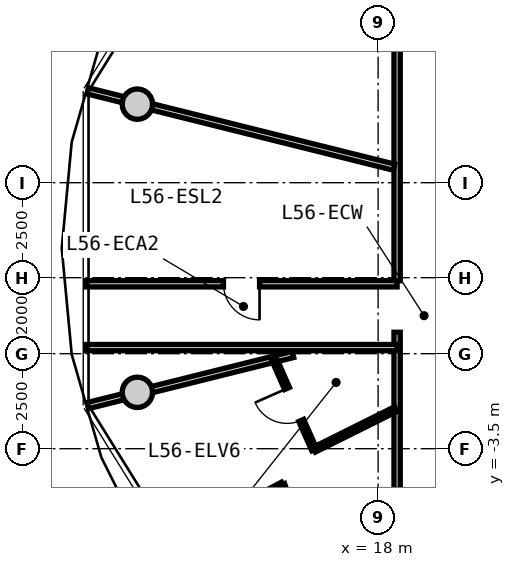
"""IFC4 building model, lengths in metres.
Left out: names, types, materials, properties, quantities, classifications, styles, units other than length and angle.
Written with IfcOpenShell. Run it as: python <this file> out.ifc"""

import sys

from ifc_helpers import new_model, si_unit, direction, frame, frame_2d, origin, origin_2d, place, context, subcontext, project, spatial, rectangle, circle, extrude, source, transform, mapped, element, fill, save


model = new_model("IFC4")
c1 = context("Model", 3, precision=1e-05, world=origin(), true_north=direction((0.0, 1.0)))
c2 = subcontext(c1, "Body", "Model", "MODEL_VIEW")
j1 = project(units=[si_unit("LENGTHUNIT", "METRE"), si_unit("PLANEANGLEUNIT", "RADIAN")], contexts=[c1])
p1 = place(None, origin())
s1 = spatial("IfcSite", under=j1, at=p1, CompositionType="ELEMENT")
p2 = place(p1, origin())
s2 = spatial("IfcBuilding", under=s1, at=p2, CompositionType="ELEMENT")
p3 = place(p2, frame((0.0, 0.0, 180.05)))
s3 = spatial("IfcBuildingStorey", under=s2, at=p3, CompositionType="ELEMENT", Elevation=180.05)
m1 = source(origin(), c2, "Body", "SweptSolid", [
    extrude(circle(Radius=0.4, at=origin_2d()), origin(), (0.0, 0.0, 1.0), 3.05),
])
for number, where, z_axis, x_axis in (
    (1, (11.665, 5.567, 0.0), (0.0, 0.0, 1.0), (1.0, 0.0, 0.0)),
    (2, (11.665, -2.016, 0.0), (0.0, 0.0, 1.0), (1.0, 0.0, 0.0)),
):
    element("IfcColumn", number, at=place(p3, frame(where, z_axis=z_axis, x_axis=x_axis)), inside=s3, PredefinedType="COLUMN", context=c2, shape_type="MappedRepresentation", body=[
        mapped(m1, transform((0.0, 0.0, 0.0), x_axis=(1.0, 0.0, 0.0), y_axis=(0.0, 1.0, 0.0), z_axis=(0.0, 0.0, 1.0), scale=1.0)),
    ])
m2 = source(origin(), c2, "Body", "SweptSolid", [
    extrude(rectangle(XDim=7.365, YDim=0.165, at=frame_2d((3.682, 0.0))), origin(), (0.0, 0.0, 1.0), 2.795),
])
p4 = place(p3, frame((18.5, -7.8, 0.0), z_axis=(0.0, 0.0, 1.0), x_axis=(0.0, 1.0, 0.0)))
e3 = element("IfcWall", 3, at=p4, inside=s3, PredefinedType="PARTITIONING", context=c2, shape_type="MappedRepresentation", body=[
    mapped(m2, transform((0.0, 0.0, 0.0), x_axis=(1.0, 0.0, 0.0), y_axis=(0.0, 1.0, 0.0), z_axis=(0.0, 0.0, 1.0), scale=1.0)),
])
m3 = source(origin(), c2, "Body", "SweptSolid", [
    extrude(rectangle(XDim=6.88, YDim=0.165, at=frame_2d((3.44, 0.0))), origin(), (0.0, 0.0, 1.0), 2.795),
])
p5 = place(p3, frame((18.5, 0.92, 0.0), z_axis=(0.0, 0.0, 1.0), x_axis=(0.0, 1.0, 0.0)))
e4 = element("IfcWall", 4, at=p5, inside=s3, PredefinedType="PARTITIONING", context=c2, shape_type="MappedRepresentation", body=[
    mapped(m3, transform((0.0, 0.0, 0.0), x_axis=(1.0, 0.0, 0.0), y_axis=(0.0, 1.0, 0.0), z_axis=(0.0, 0.0, 1.0), scale=1.0)),
])
m4 = source(origin(), c2, "Body", "SweptSolid", [
    extrude(rectangle(XDim=8.305, YDim=0.165, at=frame_2d((4.153, 0.0))), origin(), (0.0, 0.0, 1.0), 2.345),
])
p6 = place(p3, frame((18.42, 3.908, 0.0), z_axis=(0.0, 0.0, 1.0), x_axis=(-0.970309994378, 0.241864662175, 0.0)))
e5 = element("IfcWall", 5, at=p6, inside=s3, PredefinedType="PARTITIONING", context=c2, shape_type="MappedRepresentation", body=[
    mapped(m4, transform((0.0, 0.0, 0.0), x_axis=(1.0, 0.0, 0.0), y_axis=(0.0, 1.0, 0.0), z_axis=(0.0, 0.0, 1.0), scale=1.0)),
])
m5 = source(origin(), c2, "Body", "SweptSolid", [
    extrude(rectangle(XDim=5.564, YDim=0.165, at=frame_2d((2.782, 0.0))), origin(), (0.0, 0.0, 1.0), 2.345),
])
p7 = place(p3, frame((15.76, -1.02, 0.0), z_axis=(0.0, 0.0, 1.0), x_axis=(-0.970315176167, -0.241843872984, 0.0)))
e6 = element("IfcWall", 6, at=p7, inside=s3, PredefinedType="PARTITIONING", context=c2, shape_type="MappedRepresentation", body=[
    mapped(m5, transform((0.0, 0.0, 0.0), x_axis=(1.0, 0.0, 0.0), y_axis=(0.0, 1.0, 0.0), z_axis=(0.0, 0.0, 1.0), scale=1.0)),
])
m6 = source(origin(), c2, "Body", "SweptSolid", [
    extrude(rectangle(XDim=8.189, YDim=0.165, at=frame_2d((4.094, 0.0))), origin(), (0.0, 0.0, 1.0), 2.795),
])
p8 = place(p3, frame((10.311, 0.84, 0.0), z_axis=(0.0, 0.0, 1.0), x_axis=(1.0, 0.0, 0.0)))
e7 = element("IfcWall", 7, at=p8, inside=s3, PredefinedType="PARTITIONING", context=c2, shape_type="MappedRepresentation", body=[
    mapped(m6, transform((0.0, 0.0, 0.0), x_axis=(1.0, 0.0, 0.0), y_axis=(0.0, 1.0, 0.0), z_axis=(0.0, 0.0, 1.0), scale=1.0)),
])
p9 = place(p8, frame((3.619, 0.0, 0.0)))
e8 = element("IfcOpeningElement", 8, at=p9, cuts=e7, PredefinedType="OPENING", context=c2, shape_type="SweptSolid", body=[
    extrude(rectangle(XDim=0.95, YDim=2.1, at=frame_2d((0.475, 1.05))), frame((0.0, 0.093, 0.0), z_axis=(0.0, -1.0, 0.0), x_axis=(1.0, 0.0, 0.0)), (0.0, 0.0, 1.0), 0.185),
])
p10 = place(p3, frame((18.5, -0.84, 0.0), z_axis=(0.0, 0.0, 1.0), x_axis=(-1.0, 0.0, 0.0)))
e9 = element("IfcWall", 9, at=p10, inside=s3, PredefinedType="PARTITIONING", context=c2, shape_type="MappedRepresentation", body=[
    mapped(m6, transform((0.0, 0.0, 0.0), x_axis=(1.0, 0.0, 0.0), y_axis=(0.0, 1.0, 0.0), z_axis=(0.0, 0.0, 1.0), scale=1.0)),
])
m7 = source(origin(), c2, "Body", "SweptSolid", [
    extrude(rectangle(XDim=2.403, YDim=0.14, at=frame_2d((1.201, 0.0))), origin(), (0.0, 0.0, 1.0), 2.795),
])
p11 = place(p3, frame((18.47, -2.456, 0.0), z_axis=(0.0, 0.0, 1.0), x_axis=(-0.895339866084, -0.445383569748, 0.0)))
e10 = element("IfcWall", 10, at=p11, inside=s3, PredefinedType="PARTITIONING", context=c2, shape_type="MappedRepresentation", body=[
    mapped(m7, transform((0.0, 0.0, 0.0), x_axis=(1.0, 0.0, 0.0), y_axis=(0.0, 1.0, 0.0), z_axis=(0.0, 0.0, 1.0), scale=1.0)),
])
m8 = source(origin(), c2, "Body", "SweptSolid", [
    extrude(rectangle(XDim=2.606, YDim=0.14, at=frame_2d((1.303, 0.0))), origin(), (0.0, 0.0, 1.0), 2.795),
])
p12 = place(p3, frame((16.319, -3.526, 0.0), z_axis=(0.0, 0.0, 1.0), x_axis=(-0.405599540311, 0.914050880914, 0.0)))
e11 = element("IfcWall", 11, at=p12, inside=s3, PredefinedType="PARTITIONING", context=c2, shape_type="MappedRepresentation", body=[
    mapped(m8, transform((0.0, 0.0, 0.0), x_axis=(1.0, 0.0, 0.0), y_axis=(0.0, 1.0, 0.0), z_axis=(0.0, 0.0, 1.0), scale=1.0)),
])
p13 = place(p12, frame((0.843, 0.0, 0.0)))
e12 = element("IfcOpeningElement", 12, at=p13, cuts=e11, PredefinedType="OPENING", context=c2, shape_type="SweptSolid", body=[
    extrude(rectangle(XDim=0.92, YDim=2.1, at=frame_2d((0.46, 1.05))), frame((0.0, 0.08, 0.0), z_axis=(0.0, -1.0, 0.0), x_axis=(1.0, 0.0, 0.0)), (0.0, 0.0, 1.0), 0.16),
])
m9 = source(origin(), c2, "Body", "SweptSolid", [
    extrude(rectangle(XDim=3.272, YDim=0.115, at=frame_2d((1.636, 0.0))), origin(), (0.0, 0.0, 1.0), 2.795),
])
p14 = place(p3, frame((15.484, -4.432, 0.0), z_axis=(0.0, 0.0, 1.0), x_axis=(-0.885479276486, -0.464678868589, 0.0)))
e13 = element("IfcWall", 13, at=p14, inside=s3, PredefinedType="PARTITIONING", context=c2, shape_type="MappedRepresentation", body=[
    mapped(m9, transform((0.0, 0.0, 0.0), x_axis=(1.0, 0.0, 0.0), y_axis=(0.0, 1.0, 0.0), z_axis=(0.0, 0.0, 1.0), scale=1.0)),
])
m10 = source(origin(), c2, "Body", "SweptSolid", [
    extrude(rectangle(XDim=3.656, YDim=0.115, at=frame_2d((1.828, 0.0))), origin(), (0.0, 0.0, 1.0), 2.795),
])
p15 = place(p3, frame((15.484, -4.432, 0.0), z_axis=(0.0, 0.0, 1.0), x_axis=(0.313602075194, -0.949554494715, 0.0)))
e14 = element("IfcWall", 14, at=p15, inside=s3, PredefinedType="PARTITIONING", context=c2, shape_type="MappedRepresentation", body=[
    mapped(m10, transform((0.0, 0.0, 0.0), x_axis=(1.0, 0.0, 0.0), y_axis=(0.0, 1.0, 0.0), z_axis=(0.0, 0.0, 1.0), scale=1.0)),
])
p16 = place(p15, frame((1.353, 0.0, 0.0)))
e15 = element("IfcOpeningElement", 15, at=p16, cuts=e14, PredefinedType="OPENING", context=c2, shape_type="SweptSolid", body=[
    extrude(rectangle(XDim=0.95, YDim=2.1, at=frame_2d((0.475, 1.05))), frame((0.0, 0.067, 0.0), z_axis=(0.0, -1.0, 0.0), x_axis=(1.0, 0.0, 0.0)), (0.0, 0.0, 1.0), 0.135),
])
m11 = source(origin(), c2, "Body", "SweptSolid", [
    extrude(rectangle(XDim=0.95, YDim=2.1, at=frame_2d((0.475, 1.05))), frame((0.0, 0.025, 0.0), z_axis=(0.0, -1.0, 0.0), x_axis=(1.0, 0.0, 0.0)), (0.0, 0.0, 1.0), 0.05),
])
p17 = place(p9, frame((0.95, 0.0, 0.0), z_axis=(0.0, 0.0, 1.0), x_axis=(-1.0, 0.0, 0.0)))
e16 = element("IfcDoor", 16, at=p17, inside=s3, OperationType="SINGLE_SWING_LEFT", PredefinedType="DOOR", context=c2, shape_type="MappedRepresentation", body=[
    mapped(m11, transform((0.0, 0.0, 0.0), x_axis=(1.0, 0.0, 0.0), y_axis=(0.0, 1.0, 0.0), z_axis=(0.0, 0.0, 1.0), scale=1.0)),
])
fill(e8, e16)
m12 = source(origin(), c2, "Body", "SweptSolid", [
    extrude(rectangle(XDim=0.92, YDim=2.1, at=frame_2d((0.46, 1.05))), frame((0.0, 0.025, 0.0), z_axis=(0.0, -1.0, 0.0), x_axis=(1.0, 0.0, 0.0)), (0.0, 0.0, 1.0), 0.05),
])
p18 = place(p13, origin())
e17 = element("IfcDoor", 17, at=p18, inside=s3, OperationType="SINGLE_SWING_RIGHT", PredefinedType="DOOR", context=c2, shape_type="MappedRepresentation", body=[
    mapped(m12, transform((0.0, 0.0, 0.0), x_axis=(1.0, 0.0, 0.0), y_axis=(0.0, 1.0, 0.0), z_axis=(0.0, 0.0, 1.0), scale=1.0)),
])
fill(e12, e17)
save(model, sys.argv[1])
